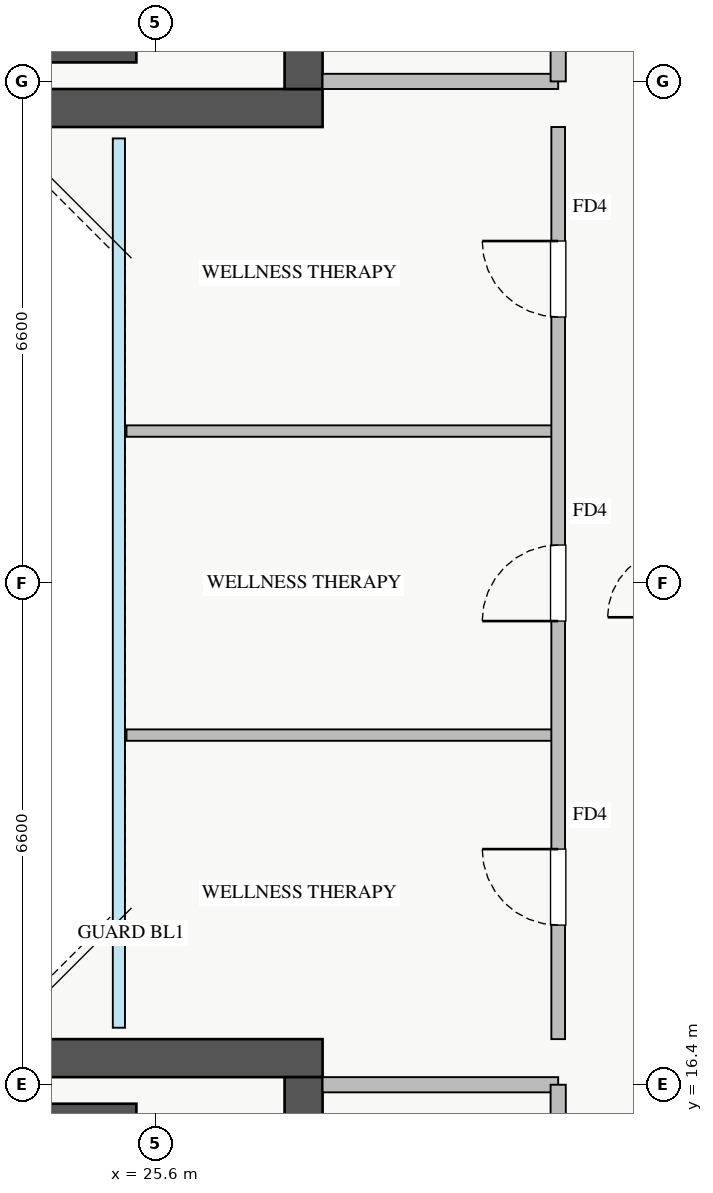
"""IFC4 building model, lengths in metres.
Left out: names, types, materials, properties, quantities, classifications, styles, units other than length and angle.
Written with IfcOpenShell. Run it as: python <this file> out.ifc"""

import sys

from ifc_helpers import new_model, si_unit, direction, frame, frame_2d, origin, place, context, subcontext, project, spatial, rectangle, extrude, source, transform, mapped, element, fill, save


model = new_model("IFC4")
c1 = context("Model", 3, precision=1e-05, world=origin(), true_north=direction((0.0, 1.0)))
c2 = subcontext(c1, "Body", "Model", "MODEL_VIEW")
j1 = project(units=[si_unit("LENGTHUNIT", "METRE"), si_unit("PLANEANGLEUNIT", "RADIAN")], contexts=[c1])
p1 = place(None, origin())
s1 = spatial("IfcSite", under=j1, at=p1, CompositionType="ELEMENT")
p2 = place(p1, origin())
s2 = spatial("IfcBuilding", under=s1, at=p2, CompositionType="ELEMENT")
p3 = place(p2, frame((0.0, 0.0, 219.75)))
s3 = spatial("IfcBuildingStorey", under=s2, at=p3, CompositionType="ELEMENT", Elevation=219.75)
for number, where, z_axis, x_axis in (
    (1, (18.2, 29.95, 0.0), (0.0, 0.0, 1.0), (1.0, 0.0, 0.0)),
    (2, (18.2, 16.05, 0.0), (0.0, 0.0, 1.0), (1.0, 0.0, 0.0)),
):
    element("IfcWall", number, at=place(p3, frame(where, z_axis=z_axis, x_axis=x_axis)), inside=s3, PredefinedType="SHEAR", context=c2, shape_type="SweptSolid", body=[
        extrude(rectangle(XDim=7.15, YDim=0.2, at=frame_2d((3.575, 0.0))), origin(), (0.0, 0.0, 1.0), 3.25),
    ])
p4 = place(p3, frame((10.2, 29.25, 0.0), z_axis=(0.0, 0.0, 1.0), x_axis=(1.0, 0.0, 0.0)))
e3 = element("IfcWall", 3, at=p4, inside=s3, PredefinedType="SHEAR", context=c2, shape_type="SweptSolid", body=[
    extrude(rectangle(XDim=17.6, YDim=0.5, at=frame_2d((8.8, 0.0))), origin(), (0.0, 0.0, 1.0), 3.25),
])
p5 = place(p3, frame((27.55, 29.5, 0.0), z_axis=(0.0, 0.0, 1.0), x_axis=(0.0, 1.0, 0.0)))
e4 = element("IfcWall", 4, at=p5, inside=s3, PredefinedType="SHEAR", context=c2, shape_type="SweptSolid", body=[
    extrude(rectangle(XDim=6.2, YDim=0.5, at=frame_2d((3.1, 0.0))), origin(), (0.0, 0.0, 1.0), 3.25),
])
p6 = place(p5, frame((1.1, 0.0, 0.0)))
e5 = element("IfcOpeningElement", 5, at=p6, cuts=e4, PredefinedType="OPENING", context=c2, shape_type="SweptSolid", body=[
    extrude(rectangle(XDim=1.3, YDim=2.05, at=frame_2d((0.65, 1.025))), frame((0.0, 0.26, 0.0), z_axis=(0.0, -1.0, 0.0), x_axis=(1.0, 0.0, 0.0)), (0.0, 0.0, 1.0), 0.52),
])
p7 = place(p3, frame((10.2, 16.75, 0.0), z_axis=(0.0, 0.0, 1.0), x_axis=(1.0, 0.0, 0.0)))
e6 = element("IfcWall", 6, at=p7, inside=s3, PredefinedType="SHEAR", context=c2, shape_type="SweptSolid", body=[
    extrude(rectangle(XDim=17.6, YDim=0.5, at=frame_2d((8.8, 0.0))), origin(), (0.0, 0.0, 1.0), 3.25),
])
p8 = place(p3, frame((27.55, 10.3, 0.0), z_axis=(0.0, 0.0, 1.0), x_axis=(0.0, 1.0, 0.0)))
e7 = element("IfcWall", 7, at=p8, inside=s3, PredefinedType="SHEAR", context=c2, shape_type="SweptSolid", body=[
    extrude(rectangle(XDim=6.2, YDim=0.5, at=frame_2d((3.1, 0.0))), origin(), (0.0, 0.0, 1.0), 3.25),
])
p9 = place(p8, frame((2.1, 0.0, 0.0)))
e8 = element("IfcOpeningElement", 8, at=p9, cuts=e7, PredefinedType="OPENING", context=c2, shape_type="SweptSolid", body=[
    extrude(rectangle(XDim=1.3, YDim=2.05, at=frame_2d((0.65, 1.025))), frame((0.0, 0.26, 0.0), z_axis=(0.0, -1.0, 0.0), x_axis=(1.0, 0.0, 0.0)), (0.0, 0.0, 1.0), 0.52),
])
p10 = place(p3, frame((27.8, 29.6, 0.0), z_axis=(0.0, 0.0, 1.0), x_axis=(1.0, 0.0, 0.0)))
e9 = element("IfcWall", 9, at=p10, inside=s3, PredefinedType="PARTITIONING", context=c2, shape_type="SweptSolid", body=[
    extrude(rectangle(XDim=3.1, YDim=0.2, at=frame_2d((1.55, 0.0))), origin(), (0.0, 0.0, 1.0), 3.07),
])
p11 = place(p3, frame((30.9, 29.6, 0.0), z_axis=(0.0, 0.0, 1.0), x_axis=(0.0, 1.0, 0.0)))
e10 = element("IfcWall", 10, at=p11, inside=s3, PredefinedType="PARTITIONING", context=c2, shape_type="SweptSolid", body=[
    extrude(rectangle(XDim=3.9, YDim=0.2, at=frame_2d((1.95, 0.0))), origin(), (0.0, 0.0, 1.0), 3.07),
])
p12 = place(p11, frame((1.4, 0.0, 0.0)))
e11 = element("IfcOpeningElement", 11, at=p12, cuts=e10, PredefinedType="OPENING", context=c2, shape_type="SweptSolid", body=[
    extrude(rectangle(XDim=1.1, YDim=2.05, at=frame_2d((0.55, 1.025))), frame((0.0, 0.11, 0.0), z_axis=(0.0, -1.0, 0.0), x_axis=(1.0, 0.0, 0.0)), (0.0, 0.0, 1.0), 0.22),
])
p13 = place(p3, frame((27.8, 16.4, 0.0), z_axis=(0.0, 0.0, 1.0), x_axis=(1.0, 0.0, 0.0)))
e12 = element("IfcWall", 12, at=p13, inside=s3, PredefinedType="PARTITIONING", context=c2, shape_type="SweptSolid", body=[
    extrude(rectangle(XDim=3.1, YDim=0.2, at=frame_2d((1.55, 0.0))), origin(), (0.0, 0.0, 1.0), 3.07),
])
p14 = place(p3, frame((30.9, 12.5, 0.0), z_axis=(0.0, 0.0, 1.0), x_axis=(0.0, 1.0, 0.0)))
e13 = element("IfcWall", 13, at=p14, inside=s3, PredefinedType="PARTITIONING", context=c2, shape_type="SweptSolid", body=[
    extrude(rectangle(XDim=3.9, YDim=0.2, at=frame_2d((1.95, 0.0))), origin(), (0.0, 0.0, 1.0), 3.07),
])
p15 = place(p14, frame((1.4, 0.0, 0.0)))
e14 = element("IfcOpeningElement", 14, at=p15, cuts=e13, PredefinedType="OPENING", context=c2, shape_type="SweptSolid", body=[
    extrude(rectangle(XDim=1.1, YDim=2.05, at=frame_2d((0.55, 1.025))), frame((0.0, 0.11, 0.0), z_axis=(0.0, -1.0, 0.0), x_axis=(1.0, 0.0, 0.0)), (0.0, 0.0, 1.0), 0.22),
])
for number, where, z_axis, x_axis in (
    (15, (25.22, 21.0, 0.0), (0.0, 0.0, 1.0), (1.0, 0.0, 0.0)),
    (16, (25.22, 25.0, 0.0), (0.0, 0.0, 1.0), (1.0, 0.0, 0.0)),
):
    element("IfcWall", number, at=place(p3, frame(where, z_axis=z_axis, x_axis=x_axis)), inside=s3, PredefinedType="PARTITIONING", context=c2, shape_type="SweptSolid", body=[
        extrude(rectangle(XDim=5.68, YDim=0.15, at=frame_2d((2.84, 0.0))), origin(), (0.0, 0.0, 1.0), 3.07),
    ])
p16 = place(p3, frame((30.9, 17.0, 0.0), z_axis=(0.0, 0.0, 1.0), x_axis=(0.0, 1.0, 0.0)))
e17 = element("IfcWall", 17, at=p16, inside=s3, PredefinedType="PARTITIONING", context=c2, shape_type="SweptSolid", body=[
    extrude(rectangle(XDim=12.0, YDim=0.18, at=frame_2d((6.0, 0.0))), origin(), (0.0, 0.0, 1.0), 3.07),
])
p17 = place(p16, frame((1.5, 0.0, 0.0)))
e18 = element("IfcOpeningElement", 18, at=p17, cuts=e17, PredefinedType="OPENING", context=c2, shape_type="SweptSolid", body=[
    extrude(rectangle(XDim=1.0, YDim=2.05, at=frame_2d((0.5, 1.025))), frame((0.0, 0.1, 0.0), z_axis=(0.0, -1.0, 0.0), x_axis=(1.0, 0.0, 0.0)), (0.0, 0.0, 1.0), 0.2),
])
p18 = place(p16, frame((5.5, 0.0, 0.0)))
e19 = element("IfcOpeningElement", 19, at=p18, cuts=e17, PredefinedType="OPENING", context=c2, shape_type="SweptSolid", body=[
    extrude(rectangle(XDim=1.0, YDim=2.05, at=frame_2d((0.5, 1.025))), frame((0.0, 0.1, 0.0), z_axis=(0.0, -1.0, 0.0), x_axis=(1.0, 0.0, 0.0)), (0.0, 0.0, 1.0), 0.2),
])
p19 = place(p16, frame((9.5, 0.0, 0.0)))
e20 = element("IfcOpeningElement", 20, at=p19, cuts=e17, PredefinedType="OPENING", context=c2, shape_type="SweptSolid", body=[
    extrude(rectangle(XDim=1.0, YDim=2.05, at=frame_2d((0.5, 1.025))), frame((0.0, 0.1, 0.0), z_axis=(0.0, -1.0, 0.0), x_axis=(1.0, 0.0, 0.0)), (0.0, 0.0, 1.0), 0.2),
])
m1 = source(origin(), c2, "Body", "SweptSolid", [
    extrude(rectangle(XDim=1.0, YDim=2.05, at=frame_2d((0.5, 1.025))), frame((0.0, 0.025, 0.0), z_axis=(0.0, -1.0, 0.0), x_axis=(1.0, 0.0, 0.0)), (0.0, 0.0, 1.0), 0.05),
])
p20 = place(p17, origin())
e21 = element("IfcDoor", 21, at=p20, inside=s3, OperationType="SINGLE_SWING_RIGHT", PredefinedType="DOOR", context=c2, shape_type="MappedRepresentation", body=[
    mapped(m1, transform((0.0, 0.0, 0.0), x_axis=(1.0, 0.0, 0.0), y_axis=(0.0, 1.0, 0.0), z_axis=(0.0, 0.0, 1.0), scale=1.0)),
])
fill(e18, e21)
p21 = place(p18, origin())
e22 = element("IfcDoor", 22, at=p21, inside=s3, OperationType="SINGLE_SWING_LEFT", PredefinedType="DOOR", context=c2, shape_type="MappedRepresentation", body=[
    mapped(m1, transform((0.0, 0.0, 0.0), x_axis=(1.0, 0.0, 0.0), y_axis=(0.0, 1.0, 0.0), z_axis=(0.0, 0.0, 1.0), scale=1.0)),
])
fill(e19, e22)
p22 = place(p19, origin())
e23 = element("IfcDoor", 23, at=p22, inside=s3, OperationType="SINGLE_SWING_RIGHT", PredefinedType="DOOR", context=c2, shape_type="MappedRepresentation", body=[
    mapped(m1, transform((0.0, 0.0, 0.0), x_axis=(1.0, 0.0, 0.0), y_axis=(0.0, 1.0, 0.0), z_axis=(0.0, 0.0, 1.0), scale=1.0)),
])
fill(e20, e23)
save(model, sys.argv[1])
